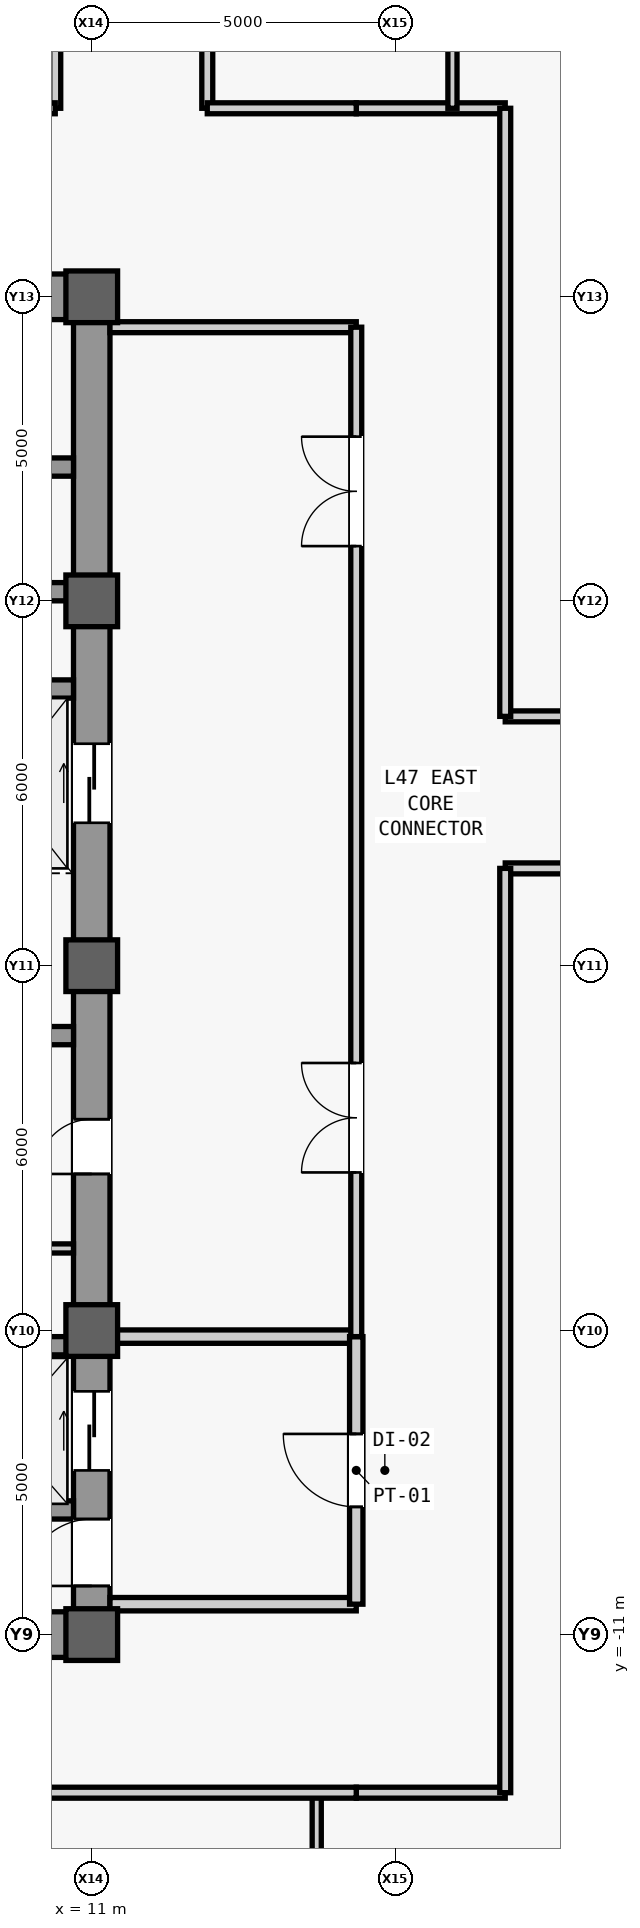
"""IFC4 building model, lengths in metres.
Left out: names, types, materials, properties, quantities, classifications, styles, units other than length and angle.
Written with IfcOpenShell. Run it as: python <this file> out.ifc"""

import sys

from ifc_helpers import new_model, si_unit, direction, frame, frame_2d, origin, origin_2d, place, context, subcontext, project, spatial, rectangle, extrude, source, transform, mapped, element, fill, save


model = new_model("IFC4")
c1 = context("Model", 3, precision=1e-05, world=origin(), true_north=direction((0.0, 1.0)))
c2 = subcontext(c1, "Body", "Model", "MODEL_VIEW")
j1 = project(units=[si_unit("LENGTHUNIT", "METRE"), si_unit("PLANEANGLEUNIT", "RADIAN")], contexts=[c1])
p1 = place(None, origin())
s1 = spatial("IfcSite", under=j1, at=p1, CompositionType="ELEMENT")
p2 = place(p1, origin())
s2 = spatial("IfcBuilding", under=s1, at=p2, CompositionType="ELEMENT")
p3 = place(p2, frame((0.0, 0.0, 203.1)))
s3 = spatial("IfcBuildingStorey", under=s2, at=p3, CompositionType="ELEMENT", Elevation=203.1)
m1 = source(origin(), c2, "Body", "SweptSolid", [
    extrude(rectangle(XDim=22.0, YDim=0.6, at=frame_2d((11.0, 0.0))), origin(), (0.0, 0.0, 1.0), 3.78),
])
p4 = place(p3, frame((11.0, -11.0, 0.0), z_axis=(0.0, 0.0, 1.0), x_axis=(0.0, 1.0, 0.0)))
e1 = element("IfcWall", 1, at=p4, inside=s3, PredefinedType="SHEAR", context=c2, shape_type="MappedRepresentation", body=[
    mapped(m1, transform((0.0, 0.0, 0.0), scale=1.0)),
])
m2 = source(origin(), c2, "Body", "SweptSolid", [
    extrude(rectangle(XDim=1.1, YDim=2.2, at=frame_2d((0.55, 1.1))), frame((0.0, 0.31, 0.0), z_axis=(0.0, -1.0, 0.0), x_axis=(1.0, 0.0, 0.0)), (0.0, 0.0, 1.0), 0.62),
])
p5 = place(p4, frame((0.8, 0.0, 0.0)))
e2 = element("IfcOpeningElement", 2, at=p5, cuts=e1, PredefinedType="OPENING", context=c2, shape_type="MappedRepresentation", body=[
    mapped(m2, transform((0.0, 0.0, 0.0), scale=1.0)),
])
m3 = source(origin(), c2, "Body", "SweptSolid", [
    extrude(rectangle(XDim=0.9, YDim=2.15, at=frame_2d((0.45, 1.075))), frame((0.0, 0.31, 0.0), z_axis=(0.0, -1.0, 0.0), x_axis=(1.0, 0.0, 0.0)), (0.0, 0.0, 1.0), 0.62),
])
p6 = place(p4, frame((7.575, 0.0, 0.0)))
e3 = element("IfcOpeningElement", 3, at=p6, cuts=e1, PredefinedType="OPENING", context=c2, shape_type="MappedRepresentation", body=[
    mapped(m3, transform((0.0, 0.0, 0.0), scale=1.0)),
])
m4 = source(origin(), c2, "Body", "SweptSolid", [
    extrude(rectangle(XDim=1.3, YDim=2.3, at=frame_2d((0.65, 1.15))), frame((0.0, 0.31, 0.0), z_axis=(0.0, -1.0, 0.0), x_axis=(1.0, 0.0, 0.0)), (0.0, 0.0, 1.0), 0.62),
])
p7 = place(p4, frame((2.7, 0.0, 0.0)))
e4 = element("IfcOpeningElement", 4, at=p7, cuts=e1, PredefinedType="OPENING", context=c2, shape_type="MappedRepresentation", body=[
    mapped(m4, transform((0.0, 0.0, 0.0), scale=1.0)),
])
p8 = place(p4, frame((13.35, 0.0, 0.0)))
e5 = element("IfcOpeningElement", 5, at=p8, cuts=e1, PredefinedType="OPENING", context=c2, shape_type="MappedRepresentation", body=[
    mapped(m4, transform((0.0, 0.0, 0.0), scale=1.0)),
])
m5 = source(origin(), c2, "Body", "SweptSolid", [
    extrude(rectangle(XDim=5.85, YDim=0.75, at=frame_2d((2.925, 0.0))), origin(), (0.0, 0.0, 1.0), 3.78),
])
p9 = place(p3, frame((4.85, -11.0, 0.0), z_axis=(0.0, 0.0, 1.0), x_axis=(1.0, 0.0, 0.0)))
e6 = element("IfcWall", 6, at=p9, inside=s3, PredefinedType="SHEAR", context=c2, shape_type="MappedRepresentation", body=[
    mapped(m5, transform((0.0, 0.0, 0.0), scale=1.0)),
])
p10 = place(p3, frame((4.85, 11.0, 0.0), z_axis=(0.0, 0.0, 1.0), x_axis=(1.0, 0.0, 0.0)))
e7 = element("IfcWall", 7, at=p10, inside=s3, PredefinedType="SHEAR", context=c2, shape_type="MappedRepresentation", body=[
    mapped(m5, transform((0.0, 0.0, 0.0), scale=1.0)),
])
m6 = source(origin(), c2, "Body", "SweptSolid", [
    extrude(rectangle(XDim=0.9, YDim=2.15, at=frame_2d((0.45, 1.075))), frame((0.0, 0.385, 0.0), z_axis=(0.0, -1.0, 0.0), x_axis=(1.0, 0.0, 0.0)), (0.0, 0.0, 1.0), 0.77),
])
p11 = place(p10, frame((0.5, 0.0, 0.0)))
e8 = element("IfcOpeningElement", 8, at=p11, cuts=e7, PredefinedType="OPENING", context=c2, shape_type="MappedRepresentation", body=[
    mapped(m6, transform((0.0, 0.0, 0.0), scale=1.0)),
])
m7 = source(origin(), c2, "Body", "SweptSolid", [
    extrude(rectangle(XDim=5.6, YDim=0.3, at=frame_2d((2.8, 0.0))), origin(), (0.0, 0.0, 1.0), 3.78),
])
p12 = place(p3, frame((5.1, -1.15, 0.0), z_axis=(0.0, 0.0, 1.0), x_axis=(1.0, 0.0, 0.0)))
e9 = element("IfcWall", 9, at=p12, inside=s3, PredefinedType="SHEAR", context=c2, shape_type="MappedRepresentation", body=[
    mapped(m7, transform((0.0, 0.0, 0.0), scale=1.0)),
])
m8 = source(origin(), c2, "Body", "SweptSolid", [
    extrude(rectangle(XDim=0.85, YDim=0.85, at=origin_2d()), origin(), (0.0, 0.0, 1.0), 4.0),
])
for number, where, z_axis, x_axis in (
    (10, (11.0, -11.0, 0.0), (0.0, 0.0, 1.0), (1.0, 0.0, 0.0)),
    (11, (11.0, -6.0, 0.0), (0.0, 0.0, 1.0), (1.0, 0.0, 0.0)),
    (12, (11.0, 0.0, 0.0), (0.0, 0.0, 1.0), (1.0, 0.0, 0.0)),
    (13, (11.0, 6.0, 0.0), (0.0, 0.0, 1.0), (1.0, 0.0, 0.0)),
    (14, (11.0, 11.0, 0.0), (0.0, 0.0, 1.0), (1.0, 0.0, 0.0)),
):
    element("IfcColumn", number, at=place(p3, frame(where, z_axis=z_axis, x_axis=x_axis)), inside=s3, PredefinedType="COLUMN", context=c2, shape_type="MappedRepresentation", body=[
        mapped(m8, transform((0.0, 0.0, 0.0), scale=1.0)),
    ])
m9 = source(origin(), c2, "Body", "SweptSolid", [
    extrude(rectangle(XDim=2.2, YDim=0.3, at=frame_2d((1.1, 0.0))), origin(), (0.0, 0.0, 1.0), 3.78),
])
for number, where, z_axis, x_axis in (
    (15, (8.5, -8.95, 0.0), (0.0, 0.0, 1.0), (1.0, 0.0, 0.0)),
    (16, (8.5, -6.25, 0.0), (0.0, 0.0, 1.0), (1.0, 0.0, 0.0)),
):
    element("IfcWall", number, at=place(p3, frame(where, z_axis=z_axis, x_axis=x_axis)), inside=s3, PredefinedType="SHEAR", context=c2, shape_type="MappedRepresentation", body=[
        mapped(m9, transform((0.0, 0.0, 0.0), scale=1.0)),
    ])
m10 = source(origin(), c2, "Body", "SweptSolid", [
    extrude(rectangle(XDim=2.3, YDim=0.3, at=frame_2d((1.15, 0.0))), origin(), (0.0, 0.0, 1.0), 3.78),
])
for number, where, z_axis, x_axis in (
    (17, (8.4, 4.55, 0.0), (0.0, 0.0, 1.0), (1.0, 0.0, 0.0)),
    (18, (8.4, 6.15, 0.0), (0.0, 0.0, 1.0), (1.0, 0.0, 0.0)),
    (19, (8.4, 8.2, 0.0), (0.0, 0.0, 1.0), (1.0, 0.0, 0.0)),
):
    element("IfcWall", number, at=place(p3, frame(where, z_axis=z_axis, x_axis=x_axis)), inside=s3, PredefinedType="SHEAR", context=c2, shape_type="MappedRepresentation", body=[
        mapped(m10, transform((0.0, 0.0, 0.0), scale=1.0)),
    ])
m11 = source(origin(), c2, "Body", "SweptSolid", [
    extrude(rectangle(XDim=2.05, YDim=0.15, at=frame_2d((1.025, 0.0))), origin(), (0.0, 0.0, 1.0), 3.78),
])
p13 = place(p3, frame((8.65, -4.65, 0.0), z_axis=(0.0, 0.0, 1.0), x_axis=(1.0, 0.0, 0.0)))
e20 = element("IfcWall", 20, at=p13, inside=s3, PredefinedType="PARTITIONING", context=c2, shape_type="MappedRepresentation", body=[
    mapped(m11, transform((0.0, 0.0, 0.0), scale=1.0)),
])
m12 = source(origin(), c2, "Body", "SweptSolid", [
    extrude(rectangle(XDim=4.05, YDim=0.22, at=frame_2d((2.025, 0.0))), origin(), (0.0, 0.0, 1.0), 3.78),
])
p14 = place(p3, frame((11.3, -10.5, 0.0), z_axis=(0.0, 0.0, 1.0), x_axis=(1.0, 0.0, 0.0)))
e21 = element("IfcWall", 21, at=p14, inside=s3, PredefinedType="PARTITIONING", context=c2, shape_type="MappedRepresentation", body=[
    mapped(m12, transform((0.0, 0.0, 0.0), scale=1.0)),
])
m13 = source(origin(), c2, "Body", "SweptSolid", [
    extrude(rectangle(XDim=4.05, YDim=0.22, at=frame_2d((2.025, 0.0))), origin(), (0.0, 0.0, 1.0), 3.007),
])
p15 = place(p3, frame((11.3, -6.1, 0.0), z_axis=(0.0, 0.0, 1.0), x_axis=(1.0, 0.0, 0.0)))
e22 = element("IfcWall", 22, at=p15, inside=s3, PredefinedType="PARTITIONING", context=c2, shape_type="MappedRepresentation", body=[
    mapped(m13, transform((0.0, 0.0, 0.0), scale=1.0)),
])
m14 = source(origin(), c2, "Body", "SweptSolid", [
    extrude(rectangle(XDim=4.4, YDim=0.22, at=frame_2d((2.2, 0.0))), origin(), (0.0, 0.0, 1.0), 3.78),
])
p16 = place(p3, frame((15.35, -10.5, 0.0), z_axis=(0.0, 0.0, 1.0), x_axis=(0.0, 1.0, 0.0)))
e23 = element("IfcWall", 23, at=p16, inside=s3, PredefinedType="PARTITIONING", context=c2, shape_type="MappedRepresentation", body=[
    mapped(m14, transform((0.0, 0.0, 0.0), scale=1.0)),
])
m15 = source(origin(), c2, "Body", "SweptSolid", [
    extrude(rectangle(XDim=1.2, YDim=2.2, at=frame_2d((0.6, 1.1))), frame((0.0, 0.12, 0.0), z_axis=(0.0, -1.0, 0.0), x_axis=(1.0, 0.0, 0.0)), (0.0, 0.0, 1.0), 0.24),
])
p17 = place(p16, frame((1.6, 0.0, 0.0)))
e24 = element("IfcOpeningElement", 24, at=p17, cuts=e23, PredefinedType="OPENING", context=c2, shape_type="MappedRepresentation", body=[
    mapped(m15, transform((0.0, 0.0, 0.0), scale=1.0)),
])
m16 = source(origin(), c2, "Body", "SweptSolid", [
    extrude(rectangle(XDim=4.05, YDim=0.18, at=frame_2d((2.025, 0.0))), origin(), (0.0, 0.0, 1.0), 3.78),
])
p18 = place(p3, frame((11.3, 10.5, 0.0), z_axis=(0.0, 0.0, 1.0), x_axis=(1.0, 0.0, 0.0)))
e25 = element("IfcWall", 25, at=p18, inside=s3, PredefinedType="PARTITIONING", context=c2, shape_type="MappedRepresentation", body=[
    mapped(m16, transform((0.0, 0.0, 0.0), scale=1.0)),
])
m17 = source(origin(), c2, "Body", "SweptSolid", [
    extrude(rectangle(XDim=16.6, YDim=0.18, at=frame_2d((8.3, 0.0))), origin(), (0.0, 0.0, 1.0), 3.78),
])
p19 = place(p3, frame((15.35, -6.1, 0.0), z_axis=(0.0, 0.0, 1.0), x_axis=(0.0, 1.0, 0.0)))
e26 = element("IfcWall", 26, at=p19, inside=s3, PredefinedType="PARTITIONING", context=c2, shape_type="MappedRepresentation", body=[
    mapped(m17, transform((0.0, 0.0, 0.0), scale=1.0)),
])
m18 = source(origin(), c2, "Body", "SweptSolid", [
    extrude(rectangle(XDim=1.8, YDim=2.25, at=frame_2d((0.9, 1.125))), frame((0.0, 0.1, 0.0), z_axis=(0.0, -1.0, 0.0), x_axis=(1.0, 0.0, 0.0)), (0.0, 0.0, 1.0), 0.2),
])
p20 = place(p19, frame((2.7, 0.0, 0.0)))
e27 = element("IfcOpeningElement", 27, at=p20, cuts=e26, PredefinedType="OPENING", context=c2, shape_type="MappedRepresentation", body=[
    mapped(m18, transform((0.0, 0.0, 0.0), scale=1.0)),
])
p21 = place(p19, frame((13.0, 0.0, 0.0)))
e28 = element("IfcOpeningElement", 28, at=p21, cuts=e26, PredefinedType="OPENING", context=c2, shape_type="MappedRepresentation", body=[
    mapped(m18, transform((0.0, 0.0, 0.0), scale=1.0)),
])
m19 = source(origin(), c2, "Body", "SweptSolid", [
    extrude(rectangle(XDim=2.45, YDim=0.18, at=frame_2d((1.225, 0.0))), origin(), (0.0, 0.0, 1.0), 3.78),
])
for number, where, z_axis, x_axis in (
    (29, (15.35, -13.6, 0.0), (0.0, 0.0, 1.0), (1.0, 0.0, 0.0)),
    (30, (15.35, 14.1, 0.0), (0.0, 0.0, 1.0), (1.0, 0.0, 0.0)),
):
    element("IfcWall", number, at=place(p3, frame(where, z_axis=z_axis, x_axis=x_axis)), inside=s3, PredefinedType="PARTITIONING", context=c2, shape_type="MappedRepresentation", body=[
        mapped(m19, transform((0.0, 0.0, 0.0), scale=1.0)),
    ])
m20 = source(origin(), c2, "Body", "SweptSolid", [
    extrude(rectangle(XDim=16.4, YDim=0.15, at=frame_2d((8.2, 0.0))), origin(), (0.0, 0.0, 1.0), 3.78),
])
p22 = place(p3, frame((14.7, -30.0, 0.0), z_axis=(0.0, 0.0, 1.0), x_axis=(0.0, 1.0, 0.0)))
e31 = element("IfcWall", 31, at=p22, inside=s3, PredefinedType="PARTITIONING", context=c2, shape_type="MappedRepresentation", body=[
    mapped(m20, transform((0.0, 0.0, 0.0), scale=1.0)),
])
m21 = source(origin(), c2, "Body", "SweptSolid", [
    extrude(rectangle(XDim=0.95, YDim=2.15, at=frame_2d((0.475, 1.075))), frame((0.0, 0.085, 0.0), z_axis=(0.0, -1.0, 0.0), x_axis=(1.0, 0.0, 0.0)), (0.0, 0.0, 1.0), 0.17),
])
p23 = place(p22, frame((11.825, 0.0, 0.0)))
e32 = element("IfcOpeningElement", 32, at=p23, cuts=e31, PredefinedType="OPENING", context=c2, shape_type="MappedRepresentation", body=[
    mapped(m21, transform((0.0, 0.0, 0.0), scale=1.0)),
])
m22 = source(origin(), c2, "Body", "SweptSolid", [
    extrude(rectangle(XDim=11.45, YDim=0.18, at=frame_2d((5.725, 0.0))), origin(), (0.0, 0.0, 1.0), 3.78),
])
p24 = place(p3, frame((3.9, -13.6, 0.0), z_axis=(0.0, 0.0, 1.0), x_axis=(1.0, 0.0, 0.0)))
e33 = element("IfcWall", 33, at=p24, inside=s3, PredefinedType="PARTITIONING", context=c2, shape_type="MappedRepresentation", body=[
    mapped(m22, transform((0.0, 0.0, 0.0), scale=1.0)),
])
m23 = source(origin(), c2, "Body", "SweptSolid", [
    extrude(rectangle(XDim=15.9, YDim=0.18, at=frame_2d((7.95, 0.0))), origin(), (0.0, 0.0, 1.0), 3.78),
])
p25 = place(p3, frame((10.4, 14.1, 0.0), z_axis=(0.0, 0.0, 1.0), x_axis=(0.0, 1.0, 0.0)))
e34 = element("IfcWall", 34, at=p25, inside=s3, PredefinedType="PARTITIONING", context=c2, shape_type="MappedRepresentation", body=[
    mapped(m23, transform((0.0, 0.0, 0.0), scale=1.0)),
])
m24 = source(origin(), c2, "Body", "SweptSolid", [
    extrude(rectangle(XDim=1.05, YDim=2.2, at=frame_2d((0.525, 1.1))), frame((0.0, 0.1, 0.0), z_axis=(0.0, -1.0, 0.0), x_axis=(1.0, 0.0, 0.0)), (0.0, 0.0, 1.0), 0.2),
])
p26 = place(p25, frame((11.4, 0.0, 0.0)))
e35 = element("IfcOpeningElement", 35, at=p26, cuts=e34, PredefinedType="OPENING", context=c2, shape_type="MappedRepresentation", body=[
    mapped(m24, transform((0.0, 0.0, 0.0), scale=1.0)),
])
m25 = source(origin(), c2, "Body", "SweptSolid", [
    extrude(rectangle(XDim=25.75, YDim=0.18, at=frame_2d((12.875, 0.0))), origin(), (0.0, 0.0, 1.0), 3.78),
])
p27 = place(p3, frame((-15.35, 14.1, 0.0), z_axis=(0.0, 0.0, 1.0), x_axis=(1.0, 0.0, 0.0)))
e36 = element("IfcWall", 36, at=p27, inside=s3, PredefinedType="PARTITIONING", context=c2, shape_type="MappedRepresentation", body=[
    mapped(m25, transform((0.0, 0.0, 0.0), scale=1.0)),
])
m26 = source(origin(), c2, "Body", "SweptSolid", [
    extrude(rectangle(XDim=15.9, YDim=0.15, at=frame_2d((7.95, 0.0))), origin(), (0.0, 0.0, 1.0), 3.78),
])
p28 = place(p3, frame((16.932, 14.1, 0.0), z_axis=(0.0, 0.0, 1.0), x_axis=(0.0, 1.0, 0.0)))
e37 = element("IfcWall", 37, at=p28, inside=s3, PredefinedType="PARTITIONING", context=c2, shape_type="MappedRepresentation", body=[
    mapped(m26, transform((0.0, 0.0, 0.0), scale=1.0)),
])
p29 = place(p28, frame((11.45, 0.0, 0.0)))
e38 = element("IfcOpeningElement", 38, at=p29, cuts=e37, PredefinedType="OPENING", context=c2, shape_type="MappedRepresentation", body=[
    mapped(m21, transform((0.0, 0.0, 0.0), scale=1.0)),
])
p30 = place(p3, frame((12.9, 14.1, 0.0), z_axis=(0.0, 0.0, 1.0), x_axis=(0.0, 1.0, 0.0)))
e39 = element("IfcWall", 39, at=p30, inside=s3, PredefinedType="PARTITIONING", context=c2, shape_type="MappedRepresentation", body=[
    mapped(m23, transform((0.0, 0.0, 0.0), scale=1.0)),
])
p31 = place(p30, frame((11.4, 0.0, 0.0)))
e40 = element("IfcOpeningElement", 40, at=p31, cuts=e39, PredefinedType="OPENING", context=c2, shape_type="MappedRepresentation", body=[
    mapped(m24, transform((0.0, 0.0, 0.0), scale=1.0)),
])
m27 = source(origin(), c2, "Body", "SweptSolid", [
    extrude(rectangle(XDim=2.45, YDim=0.18, at=frame_2d((1.225, 0.0))), origin(), (0.0, 0.0, 1.0), 3.78),
])
p32 = place(p3, frame((12.9, 14.1, 0.0), z_axis=(0.0, 0.0, 1.0), x_axis=(1.0, 0.0, 0.0)))
e41 = element("IfcWall", 41, at=p32, inside=s3, PredefinedType="PARTITIONING", context=c2, shape_type="MappedRepresentation", body=[
    mapped(m27, transform((0.0, 0.0, 0.0), scale=1.0)),
])
m28 = source(origin(), c2, "Body", "SweptSolid", [
    extrude(rectangle(XDim=12.2, YDim=0.18, at=frame_2d((6.1, 0.0))), origin(), (0.0, 0.0, 1.0), 3.78),
])
p33 = place(p3, frame((17.8, 1.6, 0.0), z_axis=(0.0, 0.0, 1.0), x_axis=(1.0, 0.0, 0.0)))
e42 = element("IfcWall", 42, at=p33, inside=s3, PredefinedType="PARTITIONING", context=c2, shape_type="MappedRepresentation", body=[
    mapped(m28, transform((0.0, 0.0, 0.0), scale=1.0)),
])
m29 = source(origin(), c2, "Body", "SweptSolid", [
    extrude(rectangle(XDim=0.95, YDim=2.15, at=frame_2d((0.475, 1.075))), frame((0.0, 0.1, 0.0), z_axis=(0.0, -1.0, 0.0), x_axis=(1.0, 0.0, 0.0)), (0.0, 0.0, 1.0), 0.2),
])
p34 = place(p33, frame((2.758, 0.0, 0.0)))
e43 = element("IfcOpeningElement", 43, at=p34, cuts=e42, PredefinedType="OPENING", context=c2, shape_type="MappedRepresentation", body=[
    mapped(m29, transform((0.0, 0.0, 0.0), scale=1.0)),
])
p35 = place(p33, frame((8.858, 0.0, 0.0)))
e44 = element("IfcOpeningElement", 44, at=p35, cuts=e42, PredefinedType="OPENING", context=c2, shape_type="MappedRepresentation", body=[
    mapped(m29, transform((0.0, 0.0, 0.0), scale=1.0)),
])
m30 = source(origin(), c2, "Body", "SweptSolid", [
    extrude(rectangle(XDim=15.2, YDim=0.18, at=frame_2d((7.6, 0.0))), origin(), (0.0, 0.0, 1.0), 3.78),
])
p36 = place(p3, frame((17.8, -13.6, 0.0), z_axis=(0.0, 0.0, 1.0), x_axis=(0.0, 1.0, 0.0)))
e45 = element("IfcWall", 45, at=p36, inside=s3, PredefinedType="PARTITIONING", context=c2, shape_type="MappedRepresentation", body=[
    mapped(m30, transform((0.0, 0.0, 0.0), scale=1.0)),
])
p37 = place(p3, frame((17.8, 4.1, 0.0), z_axis=(0.0, 0.0, 1.0), x_axis=(1.0, 0.0, 0.0)))
e46 = element("IfcWall", 46, at=p37, inside=s3, PredefinedType="PARTITIONING", context=c2, shape_type="MappedRepresentation", body=[
    mapped(m28, transform((0.0, 0.0, 0.0), scale=1.0)),
])
p38 = place(p37, frame((5.625, 0.0, 0.0)))
e47 = element("IfcOpeningElement", 47, at=p38, cuts=e46, PredefinedType="OPENING", context=c2, shape_type="MappedRepresentation", body=[
    mapped(m29, transform((0.0, 0.0, 0.0), scale=1.0)),
])
m31 = source(origin(), c2, "Body", "SweptSolid", [
    extrude(rectangle(XDim=10.0, YDim=0.18, at=frame_2d((5.0, 0.0))), origin(), (0.0, 0.0, 1.0), 3.78),
])
p39 = place(p3, frame((17.8, 4.1, 0.0), z_axis=(0.0, 0.0, 1.0), x_axis=(0.0, 1.0, 0.0)))
e48 = element("IfcWall", 48, at=p39, inside=s3, PredefinedType="PARTITIONING", context=c2, shape_type="MappedRepresentation", body=[
    mapped(m31, transform((0.0, 0.0, 0.0), scale=1.0)),
])
m32 = source(origin(), c2, "Body", "SweptSolid", [
    extrude(rectangle(XDim=1.1, YDim=2.2, at=frame_2d((0.55, 1.1))), frame((0.0, 0.025, 0.0), z_axis=(0.0, -1.0, 0.0), x_axis=(1.0, 0.0, 0.0)), (0.0, 0.0, 1.0), 0.05),
])
p40 = place(p5, origin())
e49 = element("IfcDoor", 49, at=p40, inside=s3, OperationType="SINGLE_SWING_LEFT", PredefinedType="DOOR", context=c2, shape_type="MappedRepresentation", body=[
    mapped(m32, transform((0.0, 0.0, 0.0), scale=1.0)),
])
fill(e2, e49)
m33 = source(origin(), c2, "Body", "SweptSolid", [
    extrude(rectangle(XDim=0.9, YDim=2.15, at=frame_2d((0.45, 1.075))), frame((0.0, 0.025, 0.0), z_axis=(0.0, -1.0, 0.0), x_axis=(1.0, 0.0, 0.0)), (0.0, 0.0, 1.0), 0.05),
])
p41 = place(p6, origin())
e50 = element("IfcDoor", 50, at=p41, inside=s3, OperationType="SINGLE_SWING_LEFT", PredefinedType="DOOR", context=c2, shape_type="MappedRepresentation", body=[
    mapped(m33, transform((0.0, 0.0, 0.0), scale=1.0)),
])
fill(e3, e50)
m34 = source(origin(), c2, "Body", "SweptSolid", [
    extrude(rectangle(XDim=1.2, YDim=2.2, at=frame_2d((0.6, 1.1))), frame((0.0, 0.025, 0.0), z_axis=(0.0, -1.0, 0.0), x_axis=(1.0, 0.0, 0.0)), (0.0, 0.0, 1.0), 0.05),
])
p42 = place(p17, origin())
e51 = element("IfcDoor", 51, at=p42, inside=s3, OperationType="SINGLE_SWING_RIGHT", PredefinedType="DOOR", context=c2, shape_type="MappedRepresentation", body=[
    mapped(m34, transform((0.0, 0.0, 0.0), scale=1.0)),
])
fill(e24, e51)
m35 = source(origin(), c2, "Body", "SweptSolid", [
    extrude(rectangle(XDim=1.8, YDim=2.25, at=frame_2d((0.9, 1.125))), frame((0.0, 0.025, 0.0), z_axis=(0.0, -1.0, 0.0), x_axis=(1.0, 0.0, 0.0)), (0.0, 0.0, 1.0), 0.05),
])
p43 = place(p20, origin())
e52 = element("IfcDoor", 52, at=p43, inside=s3, OperationType="SINGLE_SWING_RIGHT", PredefinedType="DOOR", context=c2, shape_type="MappedRepresentation", body=[
    mapped(m35, transform((0.0, 0.0, 0.0), scale=1.0)),
])
fill(e27, e52)
p44 = place(p21, origin())
e53 = element("IfcDoor", 53, at=p44, inside=s3, OperationType="SINGLE_SWING_LEFT", PredefinedType="DOOR", context=c2, shape_type="MappedRepresentation", body=[
    mapped(m35, transform((0.0, 0.0, 0.0), scale=1.0)),
])
fill(e28, e53)
m36 = source(origin(), c2, "Body", "SweptSolid", [
    extrude(rectangle(XDim=1.3, YDim=2.3, at=frame_2d((0.65, 1.15))), frame((0.0, 0.025, 0.0), z_axis=(0.0, -1.0, 0.0), x_axis=(1.0, 0.0, 0.0)), (0.0, 0.0, 1.0), 0.05),
])
p45 = place(p7, origin())
e54 = element("IfcDoor", 54, at=p45, inside=s3, OperationType="SLIDING_TO_LEFT", PredefinedType="DOOR", context=c2, shape_type="MappedRepresentation", body=[
    mapped(m36, transform((0.0, 0.0, 0.0), scale=1.0)),
])
fill(e4, e54)
p46 = place(p8, origin())
e55 = element("IfcDoor", 55, at=p46, inside=s3, OperationType="SLIDING_TO_LEFT", PredefinedType="DOOR", context=c2, shape_type="MappedRepresentation", body=[
    mapped(m36, transform((0.0, 0.0, 0.0), scale=1.0)),
])
fill(e5, e55)
save(model, sys.argv[1])
